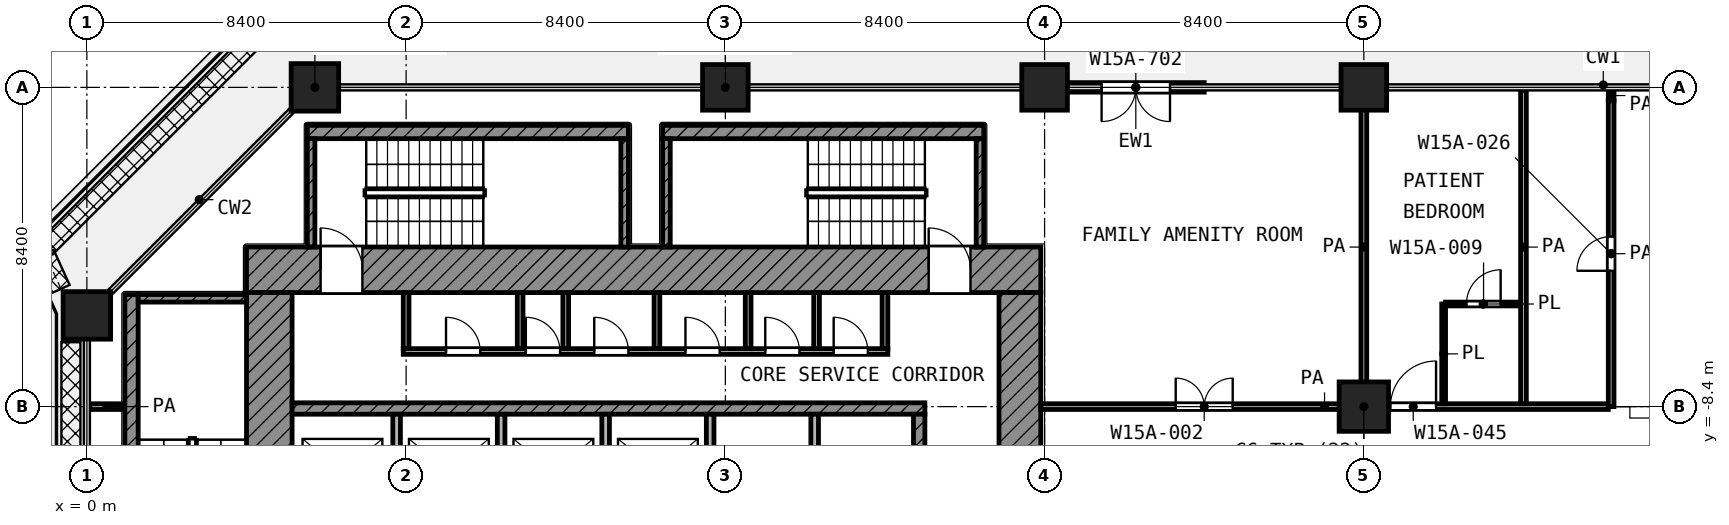
"""IFC4 building model, lengths in metres.
Left out: names, types, materials, properties, quantities, classifications, styles, units other than length and angle.
Written with IfcOpenShell. Run it as: python <this file> out.ifc"""

import sys

from ifc_helpers import new_model, si_unit, direction, frame, frame_2d, origin, origin_2d, place, context, subcontext, project, spatial, rectangle, extrude, element, fill, save


model = new_model("IFC4")
c1 = context("Model", 3, precision=1e-05, world=origin(), true_north=direction((0.0, 1.0)))
c2 = subcontext(c1, "Body", "Model", "MODEL_VIEW")
j1 = project(units=[si_unit("LENGTHUNIT", "METRE"), si_unit("PLANEANGLEUNIT", "RADIAN")], contexts=[c1])
p1 = place(None, origin())
s1 = spatial("IfcSite", under=j1, at=p1, CompositionType="ELEMENT")
p2 = place(p1, origin())
s2 = spatial("IfcBuilding", under=s1, at=p2, CompositionType="ELEMENT")
p3 = place(p2, frame((0.0, 0.0, 68.6)))
s3 = spatial("IfcBuildingStorey", under=s2, at=p3, CompositionType="ELEMENT", Elevation=68.6)
p4 = place(p3, frame((6.0, 0.0, 0.0), z_axis=(0.0, 0.0, 1.0), x_axis=(1.0, 0.0, 0.0)))
e1 = element("IfcColumn", 1, at=p4, inside=s3, PredefinedType="COLUMN", context=c2, shape_type="SweptSolid", body=[
    extrude(rectangle(XDim=1.25, YDim=1.25, at=origin_2d()), origin(), (0.0, 0.0, 1.0), 4.2),
])
for number, where, z_axis, x_axis in (
    (2, (16.8, 0.0, 0.0), (0.0, 0.0, 1.0), (1.0, 0.0, 0.0)),
    (3, (25.2, 0.0, 0.0), (0.0, 0.0, 1.0), (1.0, 0.0, 0.0)),
    (4, (33.6, 0.0, 0.0), (0.0, 0.0, 1.0), (1.0, 0.0, 0.0)),
):
    element("IfcColumn", number, at=place(p3, frame(where, z_axis=z_axis, x_axis=x_axis)), inside=s3, PredefinedType="COLUMN", context=c2, shape_type="SweptSolid", body=[
        extrude(rectangle(XDim=1.2, YDim=1.2, at=origin_2d()), origin(), (0.0, 0.0, 1.0), 4.2),
    ])
p5 = place(p3, frame((0.0, -6.0, 0.0), z_axis=(0.0, 0.0, 1.0), x_axis=(1.0, 0.0, 0.0)))
e5 = element("IfcColumn", 5, at=p5, inside=s3, PredefinedType="COLUMN", context=c2, shape_type="SweptSolid", body=[
    extrude(rectangle(XDim=1.25, YDim=1.25, at=origin_2d()), origin(), (0.0, 0.0, 1.0), 4.2),
])
p6 = place(p3, frame((33.6, -8.4, 0.0), z_axis=(0.0, 0.0, 1.0), x_axis=(1.0, 0.0, 0.0)))
e6 = element("IfcColumn", 6, at=p6, inside=s3, PredefinedType="COLUMN", context=c2, shape_type="SweptSolid", body=[
    extrude(rectangle(XDim=1.3, YDim=1.3, at=origin_2d()), origin(), (0.0, 0.0, 1.0), 4.2),
])
p7 = place(p3, frame((29.4, 0.0, 0.0), z_axis=(0.0, 0.0, 1.0), x_axis=(-1.0, 0.0, 0.0)))
e7 = element("IfcWall", 7, at=p7, inside=s3, PredefinedType="SOLIDWALL", context=c2, shape_type="SweptSolid", body=[
    extrude(rectangle(XDim=3.6, YDim=0.25, at=frame_2d((1.8, 0.0))), origin(), (0.0, 0.0, 1.0), 3.78),
])
p8 = place(p7, frame((0.9, 0.0, 0.0)))
e8 = element("IfcOpeningElement", 8, at=p8, cuts=e7, PredefinedType="OPENING", context=c2, shape_type="SweptSolid", body=[
    extrude(rectangle(XDim=1.8, YDim=2.1, at=frame_2d((0.9, 1.05))), frame((0.0, 0.135, 0.0), z_axis=(0.0, -1.0, 0.0), x_axis=(1.0, 0.0, 0.0)), (0.0, 0.0, 1.0), 0.27),
])
p9 = place(p3, frame((4.2, -4.8, 0.0), z_axis=(0.0, 0.0, 1.0), x_axis=(1.0, 0.0, 0.0)))
e9 = element("IfcWall", 9, at=p9, inside=s3, PredefinedType="SHEAR", context=c2, shape_type="SweptSolid", body=[
    extrude(rectangle(XDim=20.9, YDim=1.2, at=frame_2d((10.45, 0.0))), origin(), (0.0, 0.0, 1.0), 3.9),
])
p10 = place(p9, frame((1.95, 0.0, 0.0)))
e10 = element("IfcOpeningElement", 10, at=p10, cuts=e9, PredefinedType="OPENING", context=c2, shape_type="SweptSolid", body=[
    extrude(rectangle(XDim=1.1, YDim=2.1, at=frame_2d((0.55, 1.05))), frame((0.0, 0.61, 0.0), z_axis=(0.0, -1.0, 0.0), x_axis=(1.0, 0.0, 0.0)), (0.0, 0.0, 1.0), 1.22),
])
p11 = place(p9, frame((17.95, 0.0, 0.0)))
e11 = element("IfcOpeningElement", 11, at=p11, cuts=e9, PredefinedType="OPENING", context=c2, shape_type="SweptSolid", body=[
    extrude(rectangle(XDim=1.1, YDim=2.1, at=frame_2d((0.55, 1.05))), frame((0.0, 0.61, 0.0), z_axis=(0.0, -1.0, 0.0), x_axis=(1.0, 0.0, 0.0)), (0.0, 0.0, 1.0), 1.22),
])
p12 = place(p3, frame((4.8, -25.1, 0.0), z_axis=(0.0, 0.0, 1.0), x_axis=(0.0, 1.0, 0.0)))
e12 = element("IfcWall", 12, at=p12, inside=s3, PredefinedType="SHEAR", context=c2, shape_type="SweptSolid", body=[
    extrude(rectangle(XDim=19.7, YDim=1.2, at=frame_2d((9.85, 0.0))), origin(), (0.0, 0.0, 1.0), 3.9),
])
p13 = place(p12, frame((11.55, 0.0, 0.0)))
e13 = element("IfcOpeningElement", 13, at=p13, cuts=e12, PredefinedType="OPENING", context=c2, shape_type="SweptSolid", body=[
    extrude(rectangle(XDim=1.1, YDim=2.1, at=frame_2d((0.55, 1.05))), frame((0.0, 0.61, 0.0), z_axis=(0.0, -1.0, 0.0), x_axis=(1.0, 0.0, 0.0)), (0.0, 0.0, 1.0), 1.22),
])
p14 = place(p12, frame((2.25, 0.0, 0.0)))
e14 = element("IfcOpeningElement", 14, at=p14, cuts=e12, PredefinedType="OPENING", context=c2, shape_type="SweptSolid", body=[
    extrude(rectangle(XDim=1.1, YDim=2.1, at=frame_2d((0.55, 1.05))), frame((0.0, 0.61, 0.0), z_axis=(0.0, -1.0, 0.0), x_axis=(1.0, 0.0, 0.0)), (0.0, 0.0, 1.0), 1.22),
])
p15 = place(p3, frame((24.55, -24.0, 0.0), z_axis=(0.0, 0.0, 1.0), x_axis=(0.0, 1.0, 0.0)))
e15 = element("IfcWall", 15, at=p15, inside=s3, PredefinedType="SHEAR", context=c2, shape_type="SweptSolid", body=[
    extrude(rectangle(XDim=18.6, YDim=1.1, at=frame_2d((9.3, 0.0))), origin(), (0.0, 0.0, 1.0), 3.9),
])
p16 = place(p15, frame((10.5, 0.0, 0.0)))
e16 = element("IfcOpeningElement", 16, at=p16, cuts=e15, PredefinedType="OPENING", context=c2, shape_type="SweptSolid", body=[
    extrude(rectangle(XDim=1.8, YDim=2.1, at=frame_2d((0.9, 1.05))), frame((0.0, 0.56, 0.0), z_axis=(0.0, -1.0, 0.0), x_axis=(1.0, 0.0, 0.0)), (0.0, 0.0, 1.0), 1.12),
])
p17 = place(p3, frame((5.4, -8.45, 0.0), z_axis=(0.0, 0.0, 1.0), x_axis=(1.0, 0.0, 0.0)))
e17 = element("IfcWall", 17, at=p17, inside=s3, PredefinedType="SHEAR", context=c2, shape_type="SweptSolid", body=[
    extrude(rectangle(XDim=16.65, YDim=0.3, at=frame_2d((8.325, 0.0))), origin(), (0.0, 0.0, 1.0), 3.9),
])
p18 = place(p3, frame((21.9, -10.95, 0.0), z_axis=(0.0, 0.0, 1.0), x_axis=(0.0, 1.0, 0.0)))
e18 = element("IfcWall", 18, at=p18, inside=s3, PredefinedType="SHEAR", context=c2, shape_type="SweptSolid", body=[
    extrude(rectangle(XDim=2.35, YDim=0.3, at=frame_2d((1.175, 0.0))), origin(), (0.0, 0.0, 1.0), 3.9),
])
for number, where, z_axis, x_axis in (
    (19, (8.15, -10.95, 0.0), (0.0, 0.0, 1.0), (0.0, 1.0, 0.0)),
    (20, (10.9, -10.95, 0.0), (0.0, 0.0, 1.0), (0.0, 1.0, 0.0)),
    (21, (13.65, -10.95, 0.0), (0.0, 0.0, 1.0), (0.0, 1.0, 0.0)),
    (22, (16.4, -10.95, 0.0), (0.0, 0.0, 1.0), (0.0, 1.0, 0.0)),
    (23, (19.15, -10.95, 0.0), (0.0, 0.0, 1.0), (0.0, 1.0, 0.0)),
):
    element("IfcWall", number, at=place(p3, frame(where, z_axis=z_axis, x_axis=x_axis)), inside=s3, PredefinedType="PARTITIONING", context=c2, shape_type="SweptSolid", body=[
        extrude(rectangle(XDim=2.35, YDim=0.2, at=frame_2d((1.175, 0.0))), origin(), (0.0, 0.0, 1.0), 3.9),
    ])
p19 = place(p3, frame((8.325, -6.95, 0.0), z_axis=(0.0, 0.0, 1.0), x_axis=(1.0, 0.0, 0.0)))
e24 = element("IfcWall", 24, at=p19, inside=s3, PredefinedType="PARTITIONING", context=c2, shape_type="SweptSolid", body=[
    extrude(rectangle(XDim=12.75, YDim=0.15, at=frame_2d((6.375, 0.0))), origin(), (0.0, 0.0, 1.0), 3.9),
])
p20 = place(p19, frame((1.125, 0.0, 0.0)))
e25 = element("IfcOpeningElement", 25, at=p20, cuts=e24, PredefinedType="OPENING", context=c2, shape_type="SweptSolid", body=[
    extrude(rectangle(XDim=0.9, YDim=2.1, at=frame_2d((0.45, 1.05))), frame((0.0, 0.085, 0.0), z_axis=(0.0, -1.0, 0.0), x_axis=(1.0, 0.0, 0.0)), (0.0, 0.0, 1.0), 0.17),
])
p21 = place(p19, frame((3.225, 0.0, 0.0)))
e26 = element("IfcOpeningElement", 26, at=p21, cuts=e24, PredefinedType="OPENING", context=c2, shape_type="SweptSolid", body=[
    extrude(rectangle(XDim=0.9, YDim=2.1, at=frame_2d((0.45, 1.05))), frame((0.0, 0.085, 0.0), z_axis=(0.0, -1.0, 0.0), x_axis=(1.0, 0.0, 0.0)), (0.0, 0.0, 1.0), 0.17),
])
p22 = place(p19, frame((5.025, 0.0, 0.0)))
e27 = element("IfcOpeningElement", 27, at=p22, cuts=e24, PredefinedType="OPENING", context=c2, shape_type="SweptSolid", body=[
    extrude(rectangle(XDim=0.9, YDim=2.1, at=frame_2d((0.45, 1.05))), frame((0.0, 0.085, 0.0), z_axis=(0.0, -1.0, 0.0), x_axis=(1.0, 0.0, 0.0)), (0.0, 0.0, 1.0), 0.17),
])
p23 = place(p19, frame((7.425, 0.0, 0.0)))
e28 = element("IfcOpeningElement", 28, at=p23, cuts=e24, PredefinedType="OPENING", context=c2, shape_type="SweptSolid", body=[
    extrude(rectangle(XDim=0.9, YDim=2.1, at=frame_2d((0.45, 1.05))), frame((0.0, 0.085, 0.0), z_axis=(0.0, -1.0, 0.0), x_axis=(1.0, 0.0, 0.0)), (0.0, 0.0, 1.0), 0.17),
])
p24 = place(p19, frame((9.525, 0.0, 0.0)))
e29 = element("IfcOpeningElement", 29, at=p24, cuts=e24, PredefinedType="OPENING", context=c2, shape_type="SweptSolid", body=[
    extrude(rectangle(XDim=0.9, YDim=2.1, at=frame_2d((0.45, 1.05))), frame((0.0, 0.085, 0.0), z_axis=(0.0, -1.0, 0.0), x_axis=(1.0, 0.0, 0.0)), (0.0, 0.0, 1.0), 0.17),
])
p25 = place(p19, frame((11.325, 0.0, 0.0)))
e30 = element("IfcOpeningElement", 30, at=p25, cuts=e24, PredefinedType="OPENING", context=c2, shape_type="SweptSolid", body=[
    extrude(rectangle(XDim=0.9, YDim=2.1, at=frame_2d((0.45, 1.05))), frame((0.0, 0.085, 0.0), z_axis=(0.0, -1.0, 0.0), x_axis=(1.0, 0.0, 0.0)), (0.0, 0.0, 1.0), 0.17),
])
for number, where, z_axis, x_axis in (
    (31, (8.4, -6.875, 0.0), (0.0, 0.0, 1.0), (0.0, 1.0, 0.0)),
    (32, (11.4, -6.875, 0.0), (0.0, 0.0, 1.0), (0.0, 1.0, 0.0)),
    (33, (12.6, -6.875, 0.0), (0.0, 0.0, 1.0), (0.0, 1.0, 0.0)),
    (34, (15.0, -6.875, 0.0), (0.0, 0.0, 1.0), (0.0, 1.0, 0.0)),
    (35, (17.4, -6.875, 0.0), (0.0, 0.0, 1.0), (0.0, 1.0, 0.0)),
    (36, (19.2, -6.875, 0.0), (0.0, 0.0, 1.0), (0.0, 1.0, 0.0)),
    (37, (21.0, -6.875, 0.0), (0.0, 0.0, 1.0), (0.0, 1.0, 0.0)),
):
    element("IfcWall", number, at=place(p3, frame(where, z_axis=z_axis, x_axis=x_axis)), inside=s3, PredefinedType="PARTITIONING", context=c2, shape_type="SweptSolid", body=[
        extrude(rectangle(XDim=1.475, YDim=0.15, at=frame_2d((0.738, 0.0))), origin(), (0.0, 0.0, 1.0), 3.9),
    ])
p26 = place(p3, frame((1.175, -13.9, 0.0), z_axis=(0.0, 0.0, 1.0), x_axis=(0.0, 1.0, 0.0)))
e38 = element("IfcWall", 38, at=p26, inside=s3, PredefinedType="SHEAR", context=c2, shape_type="SweptSolid", body=[
    extrude(rectangle(XDim=8.45, YDim=0.35, at=frame_2d((4.225, 0.0))), origin(), (0.0, 0.0, 1.0), 3.9),
])
p27 = place(p3, frame((1.35, -5.55, 0.0), z_axis=(0.0, 0.0, 1.0), x_axis=(1.0, 0.0, 0.0)))
e39 = element("IfcWall", 39, at=p27, inside=s3, PredefinedType="SHEAR", context=c2, shape_type="SweptSolid", body=[
    extrude(rectangle(XDim=2.85, YDim=0.2, at=frame_2d((1.425, 0.0))), origin(), (0.0, 0.0, 1.0), 3.9),
])
p28 = place(p3, frame((5.8, -1.175, 0.0), z_axis=(0.0, 0.0, 1.0), x_axis=(1.0, 0.0, 0.0)))
e40 = element("IfcWall", 40, at=p28, inside=s3, PredefinedType="SHEAR", context=c2, shape_type="SweptSolid", body=[
    extrude(rectangle(XDim=8.45, YDim=0.35, at=frame_2d((4.225, 0.0))), origin(), (0.0, 0.0, 1.0), 3.9),
])
for number, where, z_axis, x_axis in (
    (41, (5.9, -4.2, 0.0), (0.0, 0.0, 1.0), (0.0, 1.0, 0.0)),
    (42, (14.15, -4.2, 0.0), (0.0, 0.0, 1.0), (0.0, 1.0, 0.0)),
):
    element("IfcWall", number, at=place(p3, frame(where, z_axis=z_axis, x_axis=x_axis)), inside=s3, PredefinedType="SHEAR", context=c2, shape_type="SweptSolid", body=[
        extrude(rectangle(XDim=2.85, YDim=0.2, at=frame_2d((1.425, 0.0))), origin(), (0.0, 0.0, 1.0), 3.9),
    ])
p29 = place(p3, frame((15.15, -1.175, 0.0), z_axis=(0.0, 0.0, 1.0), x_axis=(1.0, 0.0, 0.0)))
e43 = element("IfcWall", 43, at=p29, inside=s3, PredefinedType="SHEAR", context=c2, shape_type="SweptSolid", body=[
    extrude(rectangle(XDim=8.45, YDim=0.35, at=frame_2d((4.225, 0.0))), origin(), (0.0, 0.0, 1.0), 3.9),
])
for number, where, z_axis, x_axis in (
    (44, (15.25, -4.2, 0.0), (0.0, 0.0, 1.0), (0.0, 1.0, 0.0)),
    (45, (23.5, -4.2, 0.0), (0.0, 0.0, 1.0), (0.0, 1.0, 0.0)),
):
    element("IfcWall", number, at=place(p3, frame(where, z_axis=z_axis, x_axis=x_axis)), inside=s3, PredefinedType="SHEAR", context=c2, shape_type="SweptSolid", body=[
        extrude(rectangle(XDim=2.85, YDim=0.2, at=frame_2d((1.425, 0.0))), origin(), (0.0, 0.0, 1.0), 3.9),
    ])
p30 = place(p3, frame((35.75, -5.7, 0.0), z_axis=(0.0, 0.0, 1.0), x_axis=(1.0, 0.0, 0.0)))
e46 = element("IfcWall", 46, at=p30, inside=s3, PredefinedType="PARTITIONING", context=c2, shape_type="SweptSolid", body=[
    extrude(rectangle(XDim=1.975, YDim=0.1, at=frame_2d((0.988, 0.0))), origin(), (0.0, 0.0, 1.0), 3.9),
])
p31 = place(p30, frame((0.55, 0.0, 0.0)))
e47 = element("IfcOpeningElement", 47, at=p31, cuts=e46, PredefinedType="OPENING", context=c2, shape_type="SweptSolid", body=[
    extrude(rectangle(XDim=0.9, YDim=2.1, at=frame_2d((0.45, 1.05))), frame((0.0, 0.06, 0.0), z_axis=(0.0, -1.0, 0.0), x_axis=(1.0, 0.0, 0.0)), (0.0, 0.0, 1.0), 0.12),
])
p32 = place(p3, frame((35.7, -8.325, 0.0), z_axis=(0.0, 0.0, 1.0), x_axis=(0.0, 1.0, 0.0)))
e48 = element("IfcWall", 48, at=p32, inside=s3, PredefinedType="PARTITIONING", context=c2, shape_type="SweptSolid", body=[
    extrude(rectangle(XDim=2.625, YDim=0.1, at=frame_2d((1.312, 0.0))), origin(), (0.0, 0.0, 1.0), 3.9),
])
p33 = place(p3, frame((0.08, -8.4, 0.0), z_axis=(0.0, 0.0, 1.0), x_axis=(1.0, 0.0, 0.0)))
e49 = element("IfcWall", 49, at=p33, inside=s3, PredefinedType="PARTITIONING", context=c2, shape_type="SweptSolid", body=[
    extrude(rectangle(XDim=0.89, YDim=0.15, at=frame_2d((0.445, 0.0))), origin(), (0.0, 0.0, 1.0), 3.9),
])
p34 = place(p3, frame((25.1, -8.4, 0.0), z_axis=(0.0, 0.0, 1.0), x_axis=(1.0, 0.0, 0.0)))
e50 = element("IfcWall", 50, at=p34, inside=s3, PredefinedType="PARTITIONING", context=c2, shape_type="SweptSolid", body=[
    extrude(rectangle(XDim=14.932, YDim=0.15, at=frame_2d((7.466, 0.0))), origin(), (0.0, 0.0, 1.0), 3.9),
])
p35 = place(p34, frame((3.55, 0.0, 0.0)))
e51 = element("IfcOpeningElement", 51, at=p35, cuts=e50, PredefinedType="OPENING", context=c2, shape_type="SweptSolid", body=[
    extrude(rectangle(XDim=1.5, YDim=2.1, at=frame_2d((0.75, 1.05))), frame((0.0, 0.085, 0.0), z_axis=(0.0, -1.0, 0.0), x_axis=(1.0, 0.0, 0.0)), (0.0, 0.0, 1.0), 0.17),
])
p36 = place(p34, frame((9.2, 0.0, 0.0)))
e52 = element("IfcOpeningElement", 52, at=p36, cuts=e50, PredefinedType="OPENING", context=c2, shape_type="SweptSolid", body=[
    extrude(rectangle(XDim=1.2, YDim=2.1, at=frame_2d((0.6, 1.05))), frame((0.0, 0.085, 0.0), z_axis=(0.0, -1.0, 0.0), x_axis=(1.0, 0.0, 0.0)), (0.0, 0.0, 1.0), 0.17),
])
for number, where, z_axis, x_axis in (
    (53, (33.6, -8.325, 0.0), (0.0, 0.0, 1.0), (0.0, 1.0, 0.0)),
    (54, (37.8, -8.325, 0.0), (0.0, 0.0, 1.0), (0.0, 1.0, 0.0)),
):
    element("IfcWall", number, at=place(p3, frame(where, z_axis=z_axis, x_axis=x_axis)), inside=s3, PredefinedType="PARTITIONING", context=c2, shape_type="SweptSolid", body=[
        extrude(rectangle(XDim=8.245, YDim=0.15, at=frame_2d((4.123, 0.0))), origin(), (0.0, 0.0, 1.0), 3.9),
    ])
p37 = place(p3, frame((40.107, -8.4, 0.0), z_axis=(0.0, 0.0, 1.0), x_axis=(0.0, 1.0, 0.0)))
e55 = element("IfcWall", 55, at=p37, inside=s3, PredefinedType="PARTITIONING", context=c2, shape_type="SweptSolid", body=[
    extrude(rectangle(XDim=8.048, YDim=0.15, at=frame_2d((4.024, 0.0))), origin(), (0.0, 0.0, 1.0), 3.9),
])
p38 = place(p37, frame((3.574, 0.0, 0.0)))
e56 = element("IfcOpeningElement", 56, at=p38, cuts=e55, PredefinedType="OPENING", context=c2, shape_type="SweptSolid", body=[
    extrude(rectangle(XDim=0.9, YDim=2.1, at=frame_2d((0.45, 1.05))), frame((0.0, 0.085, 0.0), z_axis=(0.0, -1.0, 0.0), x_axis=(1.0, 0.0, 0.0)), (0.0, 0.0, 1.0), 0.17),
])
p39 = place(p3, frame((40.107, -0.35, 0.0), z_axis=(0.0, 0.0, 1.0), x_axis=(0.0, 1.0, 0.0)))
e57 = element("IfcWall", 57, at=p39, inside=s3, PredefinedType="PARTITIONING", context=c2, shape_type="SweptSolid", body=[
    extrude(rectangle(XDim=0.27, YDim=0.15, at=frame_2d((0.135, 0.0))), origin(), (0.0, 0.0, 1.0), 3.9),
])
p40 = place(p8, origin())
e58 = element("IfcDoor", 58, at=p40, inside=s3, OperationType="DOUBLE_DOOR_SINGLE_SWING", PredefinedType="DOOR", context=c2, shape_type="SweptSolid", body=[
    extrude(rectangle(XDim=1.8, YDim=2.1, at=frame_2d((0.9, 1.05))), frame((0.0, 0.025, 0.0), z_axis=(0.0, -1.0, 0.0), x_axis=(1.0, 0.0, 0.0)), (0.0, 0.0, 1.0), 0.05),
])
fill(e8, e58)
p41 = place(p10, origin())
e59 = element("IfcDoor", 59, at=p41, inside=s3, OperationType="SINGLE_SWING_LEFT", PredefinedType="DOOR", context=c2, shape_type="SweptSolid", body=[
    extrude(rectangle(XDim=1.1, YDim=2.1, at=frame_2d((0.55, 1.05))), frame((0.0, 0.025, 0.0), z_axis=(0.0, -1.0, 0.0), x_axis=(1.0, 0.0, 0.0)), (0.0, 0.0, 1.0), 0.05),
])
fill(e10, e59)
p42 = place(p11, origin())
e60 = element("IfcDoor", 60, at=p42, inside=s3, OperationType="SINGLE_SWING_LEFT", PredefinedType="DOOR", context=c2, shape_type="SweptSolid", body=[
    extrude(rectangle(XDim=1.1, YDim=2.1, at=frame_2d((0.55, 1.05))), frame((0.0, 0.025, 0.0), z_axis=(0.0, -1.0, 0.0), x_axis=(1.0, 0.0, 0.0)), (0.0, 0.0, 1.0), 0.05),
])
fill(e11, e60)
p43 = place(p20, origin())
e61 = element("IfcDoor", 61, at=p43, inside=s3, OperationType="SINGLE_SWING_LEFT", PredefinedType="DOOR", context=c2, shape_type="SweptSolid", body=[
    extrude(rectangle(XDim=0.9, YDim=2.1, at=frame_2d((0.45, 1.05))), frame((0.0, 0.025, 0.0), z_axis=(0.0, -1.0, 0.0), x_axis=(1.0, 0.0, 0.0)), (0.0, 0.0, 1.0), 0.05),
])
fill(e25, e61)
p44 = place(p21, origin())
e62 = element("IfcDoor", 62, at=p44, inside=s3, OperationType="SINGLE_SWING_LEFT", PredefinedType="DOOR", context=c2, shape_type="SweptSolid", body=[
    extrude(rectangle(XDim=0.9, YDim=2.1, at=frame_2d((0.45, 1.05))), frame((0.0, 0.025, 0.0), z_axis=(0.0, -1.0, 0.0), x_axis=(1.0, 0.0, 0.0)), (0.0, 0.0, 1.0), 0.05),
])
fill(e26, e62)
p45 = place(p22, origin())
e63 = element("IfcDoor", 63, at=p45, inside=s3, OperationType="SINGLE_SWING_LEFT", PredefinedType="DOOR", context=c2, shape_type="SweptSolid", body=[
    extrude(rectangle(XDim=0.9, YDim=2.1, at=frame_2d((0.45, 1.05))), frame((0.0, 0.025, 0.0), z_axis=(0.0, -1.0, 0.0), x_axis=(1.0, 0.0, 0.0)), (0.0, 0.0, 1.0), 0.05),
])
fill(e27, e63)
p46 = place(p23, origin())
e64 = element("IfcDoor", 64, at=p46, inside=s3, OperationType="SINGLE_SWING_LEFT", PredefinedType="DOOR", context=c2, shape_type="SweptSolid", body=[
    extrude(rectangle(XDim=0.9, YDim=2.1, at=frame_2d((0.45, 1.05))), frame((0.0, 0.025, 0.0), z_axis=(0.0, -1.0, 0.0), x_axis=(1.0, 0.0, 0.0)), (0.0, 0.0, 1.0), 0.05),
])
fill(e28, e64)
p47 = place(p24, origin())
e65 = element("IfcDoor", 65, at=p47, inside=s3, OperationType="SINGLE_SWING_LEFT", PredefinedType="DOOR", context=c2, shape_type="SweptSolid", body=[
    extrude(rectangle(XDim=0.9, YDim=2.1, at=frame_2d((0.45, 1.05))), frame((0.0, 0.025, 0.0), z_axis=(0.0, -1.0, 0.0), x_axis=(1.0, 0.0, 0.0)), (0.0, 0.0, 1.0), 0.05),
])
fill(e29, e65)
p48 = place(p25, origin())
e66 = element("IfcDoor", 66, at=p48, inside=s3, OperationType="SINGLE_SWING_LEFT", PredefinedType="DOOR", context=c2, shape_type="SweptSolid", body=[
    extrude(rectangle(XDim=0.9, YDim=2.1, at=frame_2d((0.45, 1.05))), frame((0.0, 0.025, 0.0), z_axis=(0.0, -1.0, 0.0), x_axis=(1.0, 0.0, 0.0)), (0.0, 0.0, 1.0), 0.05),
])
fill(e30, e66)
p49 = place(p35, origin())
e67 = element("IfcDoor", 67, at=p49, inside=s3, OperationType="DOUBLE_DOOR_SINGLE_SWING", PredefinedType="DOOR", context=c2, shape_type="SweptSolid", body=[
    extrude(rectangle(XDim=1.5, YDim=2.1, at=frame_2d((0.75, 1.05))), frame((0.0, 0.025, 0.0), z_axis=(0.0, -1.0, 0.0), x_axis=(1.0, 0.0, 0.0)), (0.0, 0.0, 1.0), 0.05),
])
fill(e51, e67)
p50 = place(p36, origin())
e68 = element("IfcDoor", 68, at=p50, inside=s3, OperationType="SINGLE_SWING_RIGHT", PredefinedType="DOOR", context=c2, shape_type="SweptSolid", body=[
    extrude(rectangle(XDim=1.2, YDim=2.1, at=frame_2d((0.6, 1.05))), frame((0.0, 0.025, 0.0), z_axis=(0.0, -1.0, 0.0), x_axis=(1.0, 0.0, 0.0)), (0.0, 0.0, 1.0), 0.05),
])
fill(e52, e68)
p51 = place(p31, origin())
e69 = element("IfcDoor", 69, at=p51, inside=s3, OperationType="SINGLE_SWING_RIGHT", PredefinedType="DOOR", context=c2, shape_type="SweptSolid", body=[
    extrude(rectangle(XDim=0.9, YDim=2.1, at=frame_2d((0.45, 1.05))), frame((0.0, 0.025, 0.0), z_axis=(0.0, -1.0, 0.0), x_axis=(1.0, 0.0, 0.0)), (0.0, 0.0, 1.0), 0.05),
])
fill(e47, e69)
p52 = place(p38, origin())
e70 = element("IfcDoor", 70, at=p52, inside=s3, OperationType="SINGLE_SWING_LEFT", PredefinedType="DOOR", context=c2, shape_type="SweptSolid", body=[
    extrude(rectangle(XDim=0.9, YDim=2.1, at=frame_2d((0.45, 1.05))), frame((0.0, 0.025, 0.0), z_axis=(0.0, -1.0, 0.0), x_axis=(1.0, 0.0, 0.0)), (0.0, 0.0, 1.0), 0.05),
])
fill(e56, e70)
save(model, sys.argv[1])
